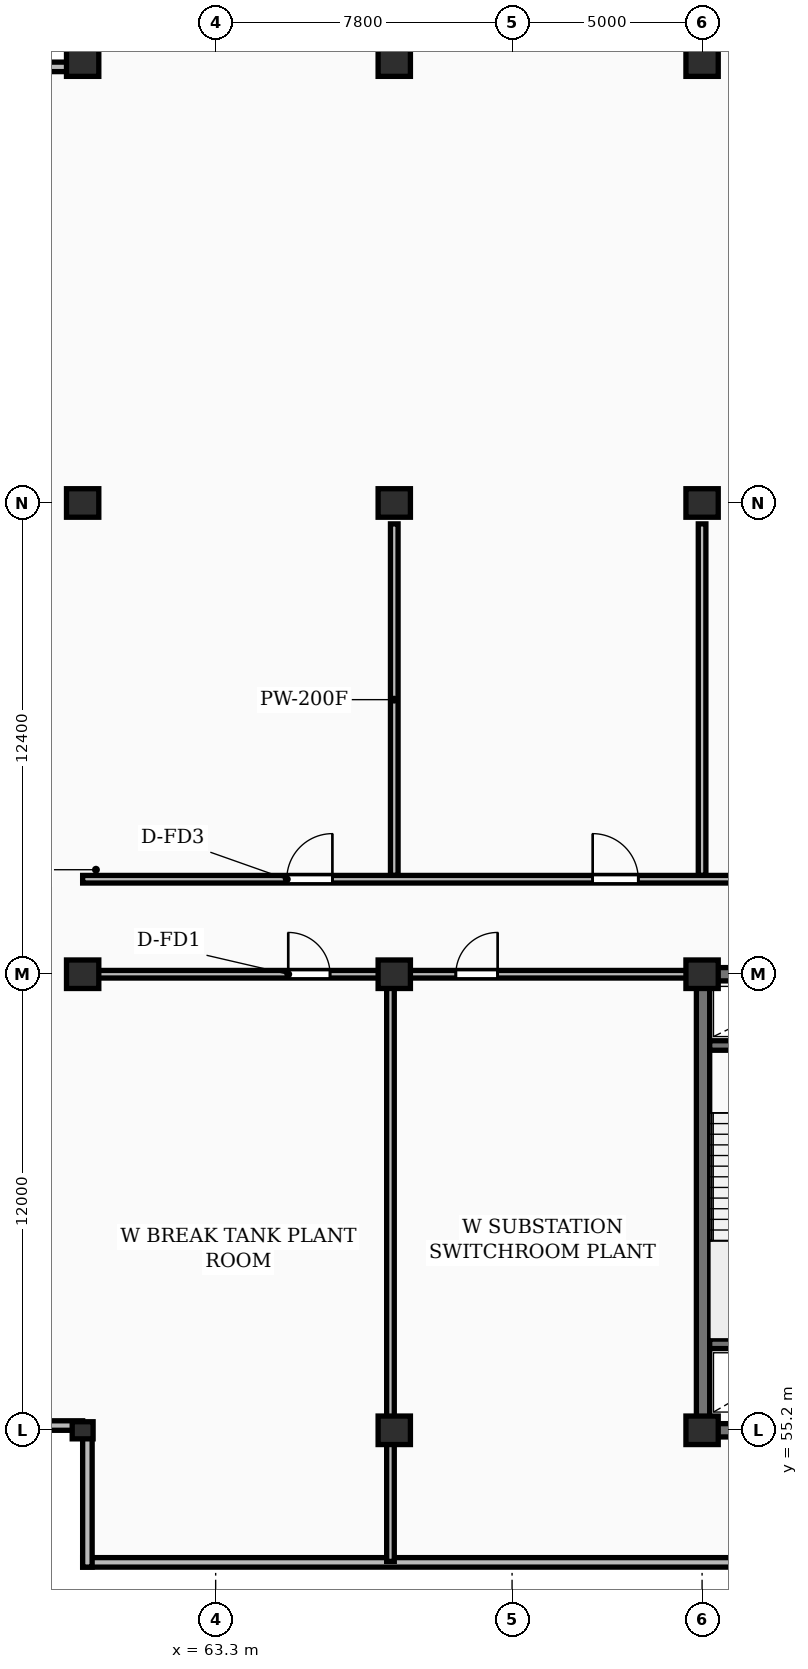
"""IFC4 building model, lengths in metres.
Left out: names, types, materials, properties, quantities, classifications, styles, units other than length and angle.
Written with IfcOpenShell. Run it as: python <this file> out.ifc"""

import sys

from ifc_helpers import new_model, si_unit, direction, frame, frame_2d, origin, origin_2d, place, context, subcontext, project, spatial, rectangle, extrude, element, fill, save


model = new_model("IFC4")
c1 = context("Model", 3, precision=1e-05, world=origin(), true_north=direction((0.0, 1.0)))
c2 = subcontext(c1, "Body", "Model", "MODEL_VIEW")
j1 = project(units=[si_unit("LENGTHUNIT", "METRE"), si_unit("PLANEANGLEUNIT", "RADIAN")], contexts=[c1])
p1 = place(None, origin())
s1 = spatial("IfcSite", under=j1, at=p1, CompositionType="ELEMENT")
p2 = place(p1, origin())
s2 = spatial("IfcBuilding", under=s1, at=p2, CompositionType="ELEMENT")
p3 = place(p2, frame((0.0, 0.0, 223.85)))
s3 = spatial("IfcBuildingStorey", under=s2, at=p3, CompositionType="ELEMENT", Elevation=223.85)
p4 = place(p3, frame((59.8, 55.2, 0.0), z_axis=(0.0, 0.0, 1.0), x_axis=(1.0, 0.0, 0.0)))
e1 = element("IfcColumn", 1, at=p4, inside=s3, PredefinedType="PILASTER", context=c2, shape_type="SweptSolid", body=[
    extrude(rectangle(XDim=0.55, YDim=0.45, at=origin_2d()), origin(), (0.0, 0.0, 1.0), 4.8),
])
for number, where, z_axis, x_axis in (
    (2, (59.8, 67.2, 0.0), (0.0, 0.0, 1.0), (1.0, 0.0, 0.0)),
    (3, (59.8, 79.6, 0.0), (0.0, 0.0, 1.0), (1.0, 0.0, 0.0)),
    (4, (59.8, 91.2, 0.0), (0.0, 0.0, 1.0), (1.0, 0.0, 0.0)),
    (5, (68.0, 55.2, 0.0), (0.0, 0.0, 1.0), (1.0, 0.0, 0.0)),
    (6, (68.0, 67.2, 0.0), (0.0, 0.0, 1.0), (1.0, 0.0, 0.0)),
    (7, (68.0, 79.6, 0.0), (0.0, 0.0, 1.0), (1.0, 0.0, 0.0)),
    (8, (68.0, 91.2, 0.0), (0.0, 0.0, 1.0), (1.0, 0.0, 0.0)),
    (9, (76.1, 55.2, 0.0), (0.0, 0.0, 1.0), (1.0, 0.0, 0.0)),
    (10, (76.1, 67.2, 0.0), (0.0, 0.0, 1.0), (1.0, 0.0, 0.0)),
    (11, (76.1, 79.6, 0.0), (0.0, 0.0, 1.0), (1.0, 0.0, 0.0)),
    (12, (76.1, 91.2, 0.0), (0.0, 0.0, 1.0), (1.0, 0.0, 0.0)),
):
    element("IfcColumn", number, at=place(p3, frame(where, z_axis=z_axis, x_axis=x_axis)), inside=s3, PredefinedType="COLUMN", context=c2, shape_type="SweptSolid", body=[
        extrude(rectangle(XDim=0.85, YDim=0.75, at=origin_2d()), origin(), (0.0, 0.0, 1.0), 4.8),
    ])
p5 = place(p3, frame((59.8, 51.725, 0.0), z_axis=(0.0, 0.0, 1.0), x_axis=(1.0, 0.0, 0.0)))
e13 = element("IfcWall", 13, at=p5, inside=s3, PredefinedType="SHEAR", context=c2, shape_type="SweptSolid", body=[
    extrude(rectangle(XDim=68.6, YDim=0.25, at=frame_2d((34.3, 0.0))), origin(), (0.0, 0.0, 1.0), 4.48),
])
for number, where, z_axis, x_axis in (
    (14, (59.925, 94.8, 0.0), (0.0, 0.0, 1.0), (0.0, -1.0, 0.0)),
    (15, (59.8, 91.075, 0.0), (0.0, 0.0, 1.0), (-1.0, 0.0, 0.0)),
    (16, (56.2, 55.325, 0.0), (0.0, 0.0, 1.0), (1.0, 0.0, 0.0)),
):
    element("IfcWall", number, at=place(p3, frame(where, z_axis=z_axis, x_axis=x_axis)), inside=s3, PredefinedType="SHEAR", context=c2, shape_type="SweptSolid", body=[
        extrude(rectangle(XDim=3.6, YDim=0.25, at=frame_2d((1.8, 0.0))), origin(), (0.0, 0.0, 1.0), 4.48),
    ])
p6 = place(p3, frame((59.925, 55.2, 0.0), z_axis=(0.0, 0.0, 1.0), x_axis=(0.0, -1.0, 0.0)))
e17 = element("IfcWall", 17, at=p6, inside=s3, PredefinedType="SHEAR", context=c2, shape_type="SweptSolid", body=[
    extrude(rectangle(XDim=3.6, YDim=0.25, at=frame_2d((1.8, 0.0))), origin(), (0.0, 0.0, 1.0), 4.48),
])
p7 = place(p3, frame((75.95, 55.2, 0.0), z_axis=(0.0, 0.0, 1.0), x_axis=(1.0, 0.0, 0.0)))
e18 = element("IfcWall", 18, at=p7, inside=s3, PredefinedType="SHEAR", context=c2, shape_type="SweptSolid", body=[
    extrude(rectangle(XDim=36.3, YDim=0.35, at=frame_2d((18.15, 0.0))), origin(), (0.0, 0.0, 1.0), 4.8),
])
p8 = place(p3, frame((76.125, 55.375, 0.0), z_axis=(0.0, 0.0, 1.0), x_axis=(0.0, 1.0, 0.0)))
e19 = element("IfcWall", 19, at=p8, inside=s3, PredefinedType="SHEAR", context=c2, shape_type="SweptSolid", body=[
    extrude(rectangle(XDim=11.65, YDim=0.35, at=frame_2d((5.825, 0.0))), origin(), (0.0, 0.0, 1.0), 4.8),
])
p9 = place(p3, frame((75.95, 67.2, 0.0), z_axis=(0.0, 0.0, 1.0), x_axis=(1.0, 0.0, 0.0)))
e20 = element("IfcWall", 20, at=p9, inside=s3, PredefinedType="SHEAR", context=c2, shape_type="SweptSolid", body=[
    extrude(rectangle(XDim=36.3, YDim=0.35, at=frame_2d((18.15, 0.0))), origin(), (0.0, 0.0, 1.0), 4.8),
])
p10 = place(p9, frame((5.25, 0.0, 0.0)))
e21 = element("IfcOpeningElement", 21, at=p10, cuts=e20, PredefinedType="OPENING", context=c2, shape_type="SweptSolid", body=[
    extrude(rectangle(XDim=1.0, YDim=2.15, at=frame_2d((0.5, 1.075))), frame((0.0, 0.185, 0.0), z_axis=(0.0, -1.0, 0.0), x_axis=(1.0, 0.0, 0.0)), (0.0, 0.0, 1.0), 0.37),
])
p11 = place(p9, frame((21.6, 0.0, 0.0)))
e22 = element("IfcOpeningElement", 22, at=p11, cuts=e20, PredefinedType="OPENING", context=c2, shape_type="SweptSolid", body=[
    extrude(rectangle(XDim=1.5, YDim=2.2, at=frame_2d((0.75, 1.1))), frame((0.0, 0.185, 0.0), z_axis=(0.0, -1.0, 0.0), x_axis=(1.0, 0.0, 0.0)), (0.0, 0.0, 1.0), 0.37),
])
p12 = place(p9, frame((30.45, 0.0, 0.0)))
e23 = element("IfcOpeningElement", 23, at=p12, cuts=e20, PredefinedType="OPENING", context=c2, shape_type="SweptSolid", body=[
    extrude(rectangle(XDim=1.0, YDim=2.15, at=frame_2d((0.5, 1.075))), frame((0.0, 0.185, 0.0), z_axis=(0.0, -1.0, 0.0), x_axis=(1.0, 0.0, 0.0)), (0.0, 0.0, 1.0), 0.37),
])
for number, where, z_axis, x_axis in (
    (24, (76.3, 57.475, 0.0), (0.0, 0.0, 1.0), (1.0, 0.0, 0.0)),
    (25, (76.3, 65.325, 0.0), (0.0, 0.0, 1.0), (1.0, 0.0, 0.0)),
):
    element("IfcWall", number, at=place(p3, frame(where, z_axis=z_axis, x_axis=x_axis)), inside=s3, PredefinedType="SHEAR", context=c2, shape_type="SweptSolid", body=[
        extrude(rectangle(XDim=3.24, YDim=0.25, at=frame_2d((1.62, 0.0))), origin(), (0.0, 0.0, 1.0), 4.8),
    ])
for number, where, z_axis, x_axis in (
    (26, (68.0, 69.8, 0.0), (0.0, 0.0, 1.0), (0.0, 1.0, 0.0)),
    (27, (76.1, 69.8, 0.0), (0.0, 0.0, 1.0), (0.0, 1.0, 0.0)),
):
    element("IfcWall", number, at=place(p3, frame(where, z_axis=z_axis, x_axis=x_axis)), inside=s3, PredefinedType="PARTITIONING", context=c2, shape_type="SweptSolid", body=[
        extrude(rectangle(XDim=9.25, YDim=0.2, at=frame_2d((4.625, 0.0))), origin(), (0.0, 0.0, 1.0), 3.23),
    ])
p13 = place(p3, frame((59.8, 69.7, 0.0), z_axis=(0.0, 0.0, 1.0), x_axis=(1.0, 0.0, 0.0)))
e28 = element("IfcWall", 28, at=p13, inside=s3, PredefinedType="PARTITIONING", context=c2, shape_type="SweptSolid", body=[
    extrude(rectangle(XDim=68.6, YDim=0.2, at=frame_2d((34.3, 0.0))), origin(), (0.0, 0.0, 1.0), 4.48),
])
p14 = place(p13, frame((5.372, 0.0, 0.0)))
e29 = element("IfcOpeningElement", 29, at=p14, cuts=e28, PredefinedType="OPENING", context=c2, shape_type="SweptSolid", body=[
    extrude(rectangle(XDim=1.2, YDim=2.15, at=frame_2d((0.6, 1.075))), frame((0.0, 0.11, 0.0), z_axis=(0.0, -1.0, 0.0), x_axis=(1.0, 0.0, 0.0)), (0.0, 0.0, 1.0), 0.22),
])
p15 = place(p13, frame((13.421, 0.0, 0.0)))
e30 = element("IfcOpeningElement", 30, at=p15, cuts=e28, PredefinedType="OPENING", context=c2, shape_type="SweptSolid", body=[
    extrude(rectangle(XDim=1.2, YDim=2.15, at=frame_2d((0.6, 1.075))), frame((0.0, 0.11, 0.0), z_axis=(0.0, -1.0, 0.0), x_axis=(1.0, 0.0, 0.0)), (0.0, 0.0, 1.0), 0.22),
])
p16 = place(p13, frame((21.884, 0.0, 0.0)))
e31 = element("IfcOpeningElement", 31, at=p16, cuts=e28, PredefinedType="OPENING", context=c2, shape_type="SweptSolid", body=[
    extrude(rectangle(XDim=1.2, YDim=2.15, at=frame_2d((0.6, 1.075))), frame((0.0, 0.11, 0.0), z_axis=(0.0, -1.0, 0.0), x_axis=(1.0, 0.0, 0.0)), (0.0, 0.0, 1.0), 0.22),
])
p17 = place(p13, frame((31.004, 0.0, 0.0)))
e32 = element("IfcOpeningElement", 32, at=p17, cuts=e28, PredefinedType="OPENING", context=c2, shape_type="SweptSolid", body=[
    extrude(rectangle(XDim=1.2, YDim=2.15, at=frame_2d((0.6, 1.075))), frame((0.0, 0.11, 0.0), z_axis=(0.0, -1.0, 0.0), x_axis=(1.0, 0.0, 0.0)), (0.0, 0.0, 1.0), 0.22),
])
p18 = place(p13, frame((35.596, 0.0, 0.0)))
e33 = element("IfcOpeningElement", 33, at=p18, cuts=e28, PredefinedType="OPENING", context=c2, shape_type="SweptSolid", body=[
    extrude(rectangle(XDim=1.2, YDim=2.15, at=frame_2d((0.6, 1.075))), frame((0.0, 0.11, 0.0), z_axis=(0.0, -1.0, 0.0), x_axis=(1.0, 0.0, 0.0)), (0.0, 0.0, 1.0), 0.22),
])
p19 = place(p13, frame((44.796, 0.0, 0.0)))
e34 = element("IfcOpeningElement", 34, at=p19, cuts=e28, PredefinedType="OPENING", context=c2, shape_type="SweptSolid", body=[
    extrude(rectangle(XDim=1.2, YDim=2.15, at=frame_2d((0.6, 1.075))), frame((0.0, 0.11, 0.0), z_axis=(0.0, -1.0, 0.0), x_axis=(1.0, 0.0, 0.0)), (0.0, 0.0, 1.0), 0.22),
])
p20 = place(p13, frame((53.991, 0.0, 0.0)))
e35 = element("IfcOpeningElement", 35, at=p20, cuts=e28, PredefinedType="OPENING", context=c2, shape_type="SweptSolid", body=[
    extrude(rectangle(XDim=1.2, YDim=2.15, at=frame_2d((0.6, 1.075))), frame((0.0, 0.11, 0.0), z_axis=(0.0, -1.0, 0.0), x_axis=(1.0, 0.0, 0.0)), (0.0, 0.0, 1.0), 0.22),
])
p21 = place(p13, frame((62.182, 0.0, 0.0)))
e36 = element("IfcOpeningElement", 36, at=p21, cuts=e28, PredefinedType="OPENING", context=c2, shape_type="SweptSolid", body=[
    extrude(rectangle(XDim=1.5, YDim=2.18, at=frame_2d((0.75, 1.09))), frame((0.0, 0.11, 0.0), z_axis=(0.0, -1.0, 0.0), x_axis=(1.0, 0.0, 0.0)), (0.0, 0.0, 1.0), 0.22),
])
p22 = place(p3, frame((67.9, 51.75, 0.0), z_axis=(0.0, 0.0, 1.0), x_axis=(0.0, 1.0, 0.0)))
e37 = element("IfcWall", 37, at=p22, inside=s3, PredefinedType="PARTITIONING", context=c2, shape_type="SweptSolid", body=[
    extrude(rectangle(XDim=15.4, YDim=0.2, at=frame_2d((7.7, 0.0))), origin(), (0.0, 0.0, 1.0), 3.23),
])
p23 = place(p3, frame((59.85, 67.2, 0.0), z_axis=(0.0, 0.0, 1.0), x_axis=(1.0, 0.0, 0.0)))
e38 = element("IfcWall", 38, at=p23, inside=s3, PredefinedType="PARTITIONING", context=c2, shape_type="SweptSolid", body=[
    extrude(rectangle(XDim=16.1, YDim=0.2, at=frame_2d((8.05, 0.0))), origin(), (0.0, 0.0, 1.0), 3.23),
])
p24 = place(p23, frame((5.36, 0.0, 0.0)))
e39 = element("IfcOpeningElement", 39, at=p24, cuts=e38, PredefinedType="OPENING", context=c2, shape_type="SweptSolid", body=[
    extrude(rectangle(XDim=1.1, YDim=2.1, at=frame_2d((0.55, 1.05))), frame((0.0, 0.11, 0.0), z_axis=(0.0, -1.0, 0.0), x_axis=(1.0, 0.0, 0.0)), (0.0, 0.0, 1.0), 0.22),
])
p25 = place(p23, frame((9.77, 0.0, 0.0)))
e40 = element("IfcOpeningElement", 40, at=p25, cuts=e38, PredefinedType="OPENING", context=c2, shape_type="SweptSolid", body=[
    extrude(rectangle(XDim=1.1, YDim=2.1, at=frame_2d((0.55, 1.05))), frame((0.0, 0.11, 0.0), z_axis=(0.0, -1.0, 0.0), x_axis=(1.0, 0.0, 0.0)), (0.0, 0.0, 1.0), 0.22),
])
p26 = place(p14, origin())
e41 = element("IfcDoor", 41, at=p26, inside=s3, OperationType="SINGLE_SWING_RIGHT", PredefinedType="DOOR", context=c2, shape_type="SweptSolid", body=[
    extrude(rectangle(XDim=1.2, YDim=2.15, at=frame_2d((0.6, 1.075))), frame((0.0, 0.025, 0.0), z_axis=(0.0, -1.0, 0.0), x_axis=(1.0, 0.0, 0.0)), (0.0, 0.0, 1.0), 0.05),
])
fill(e29, e41)
p27 = place(p15, origin())
e42 = element("IfcDoor", 42, at=p27, inside=s3, OperationType="SINGLE_SWING_LEFT", PredefinedType="DOOR", context=c2, shape_type="SweptSolid", body=[
    extrude(rectangle(XDim=1.2, YDim=2.15, at=frame_2d((0.6, 1.075))), frame((0.0, 0.025, 0.0), z_axis=(0.0, -1.0, 0.0), x_axis=(1.0, 0.0, 0.0)), (0.0, 0.0, 1.0), 0.05),
])
fill(e30, e42)
p28 = place(p24, origin())
e43 = element("IfcDoor", 43, at=p28, inside=s3, OperationType="SINGLE_SWING_LEFT", PredefinedType="DOOR", context=c2, shape_type="SweptSolid", body=[
    extrude(rectangle(XDim=1.1, YDim=2.1, at=frame_2d((0.55, 1.05))), frame((0.0, 0.025, 0.0), z_axis=(0.0, -1.0, 0.0), x_axis=(1.0, 0.0, 0.0)), (0.0, 0.0, 1.0), 0.05),
])
fill(e39, e43)
p29 = place(p25, origin())
e44 = element("IfcDoor", 44, at=p29, inside=s3, OperationType="SINGLE_SWING_RIGHT", PredefinedType="DOOR", context=c2, shape_type="SweptSolid", body=[
    extrude(rectangle(XDim=1.1, YDim=2.1, at=frame_2d((0.55, 1.05))), frame((0.0, 0.025, 0.0), z_axis=(0.0, -1.0, 0.0), x_axis=(1.0, 0.0, 0.0)), (0.0, 0.0, 1.0), 0.05),
])
fill(e40, e44)
save(model, sys.argv[1])
